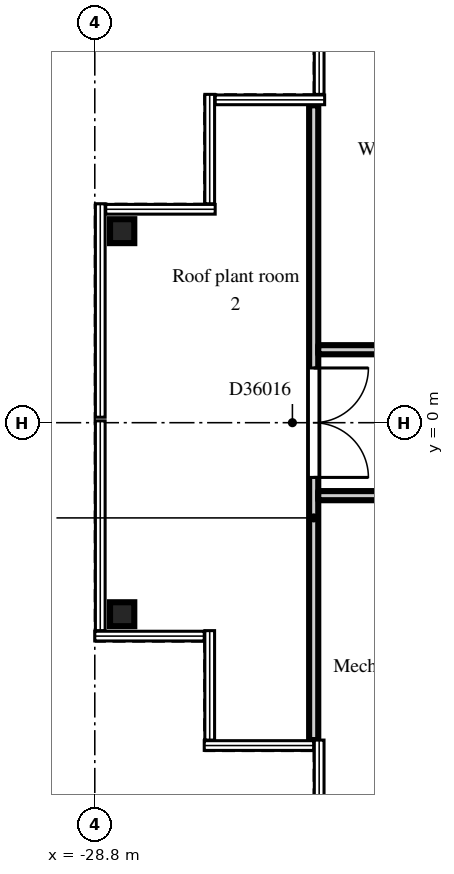
"""IFC4 building model, lengths in metres.
Left out: names, types, materials, properties, quantities, classifications, styles, units other than length and angle.
Written with IfcOpenShell. Run it as: python <this file> out.ifc"""

import sys

from ifc_helpers import new_model, si_unit, direction, frame, frame_2d, origin, origin_2d, place, context, subcontext, project, spatial, rectangle, i_section, extrude, element, fill, save


model = new_model("IFC4")
c1 = context("Model", 3, precision=1e-05, world=origin(), true_north=direction((0.0, 1.0)))
c2 = subcontext(c1, "Body", "Model", "MODEL_VIEW")
j1 = project(units=[si_unit("LENGTHUNIT", "METRE"), si_unit("PLANEANGLEUNIT", "RADIAN")], contexts=[c1])
p1 = place(None, origin())
s1 = spatial("IfcSite", under=j1, at=p1, CompositionType="ELEMENT")
p2 = place(p1, origin())
s2 = spatial("IfcBuilding", under=s1, at=p2, CompositionType="ELEMENT")
p3 = place(p2, frame((0.0, 0.0, 247.5)))
s3 = spatial("IfcBuildingStorey", under=s2, at=p3, CompositionType="ELEMENT", Elevation=247.5)
for number, where, z_axis, x_axis in (
    (1, (-28.35, -3.15, 0.0), (0.0, 0.0, 1.0), (1.0, 0.0, 0.0)),
    (2, (-28.35, 3.15, 0.0), (0.0, 0.0, 1.0), (1.0, 0.0, 0.0)),
):
    element("IfcColumn", number, at=place(p3, frame(where, z_axis=z_axis, x_axis=x_axis)), inside=s3, PredefinedType="COLUMN", context=c2, shape_type="SweptSolid", body=[
        extrude(i_section(OverallWidth=0.399, OverallDepth=0.394, WebThickness=0.023, FlangeThickness=0.037, FilletRadius=0.015, at=origin_2d()), origin(), (0.0, 0.0, 1.0), 11.861),
    ])
p4 = place(p3, frame((-25.2, -5.22, 0.0), z_axis=(0.0, 0.0, 1.0), x_axis=(0.0, 1.0, 0.0)))
e3 = element("IfcWall", 3, at=p4, inside=s3, PredefinedType="PARTITIONING", context=c2, shape_type="SweptSolid", body=[
    extrude(rectangle(XDim=10.44, YDim=0.15, at=frame_2d((5.22, 0.0))), origin(), (0.0, 0.0, 1.0), 2.7),
])
p5 = place(p4, frame((4.32, 0.0, 0.0)))
e4 = element("IfcOpeningElement", 4, at=p5, cuts=e3, PredefinedType="OPENING", context=c2, shape_type="SweptSolid", body=[
    extrude(rectangle(XDim=1.8, YDim=2.1, at=frame_2d((0.9, 1.05))), frame((0.0, 0.085, 0.0), z_axis=(0.0, -1.0, 0.0), x_axis=(1.0, 0.0, 0.0)), (0.0, 0.0, 1.0), 0.17),
])
p6 = place(p3, frame((-25.125, -1.2, 0.0), z_axis=(0.0, 0.0, 1.0), x_axis=(1.0, 0.0, 0.0)))
e5 = element("IfcWall", 5, at=p6, inside=s3, PredefinedType="PARTITIONING", context=c2, shape_type="SweptSolid", body=[
    extrude(rectangle(XDim=3.525, YDim=0.15, at=frame_2d((1.762, 0.0))), origin(), (0.0, 0.0, 1.0), 2.7),
])
p7 = place(p6, frame((1.125, 0.0, 0.0)))
e6 = element("IfcOpeningElement", 6, at=p7, cuts=e5, PredefinedType="OPENING", context=c2, shape_type="SweptSolid", body=[
    extrude(rectangle(XDim=1.2, YDim=2.1, at=frame_2d((0.6, 1.05))), frame((0.0, 0.085, 0.0), z_axis=(0.0, -1.0, 0.0), x_axis=(1.0, 0.0, 0.0)), (0.0, 0.0, 1.0), 0.17),
])
p8 = place(p3, frame((-25.125, 1.2, 0.0), z_axis=(0.0, 0.0, 1.0), x_axis=(1.0, 0.0, 0.0)))
e7 = element("IfcWall", 7, at=p8, inside=s3, PredefinedType="PARTITIONING", context=c2, shape_type="SweptSolid", body=[
    extrude(rectangle(XDim=3.525, YDim=0.15, at=frame_2d((1.762, 0.0))), origin(), (0.0, 0.0, 1.0), 2.7),
])
p9 = place(p8, frame((1.125, 0.0, 0.0)))
e8 = element("IfcOpeningElement", 8, at=p9, cuts=e7, PredefinedType="OPENING", context=c2, shape_type="SweptSolid", body=[
    extrude(rectangle(XDim=1.2, YDim=2.1, at=frame_2d((0.6, 1.05))), frame((0.0, 0.085, 0.0), z_axis=(0.0, -1.0, 0.0), x_axis=(1.0, 0.0, 0.0)), (0.0, 0.0, 1.0), 0.17),
])
p10 = place(p5, frame((1.8, 0.0, 0.0), z_axis=(0.0, 0.0, 1.0), x_axis=(-1.0, 0.0, 0.0)))
e9 = element("IfcDoor", 9, at=p10, inside=s3, OperationType="DOUBLE_DOOR_DOUBLE_SWING", PredefinedType="DOOR", context=c2, shape_type="SweptSolid", body=[
    extrude(rectangle(XDim=1.8, YDim=2.1, at=frame_2d((0.9, 1.05))), frame((0.0, 0.025, 0.0), z_axis=(0.0, -1.0, 0.0), x_axis=(1.0, 0.0, 0.0)), (0.0, 0.0, 1.0), 0.05),
])
fill(e4, e9)
save(model, sys.argv[1])
